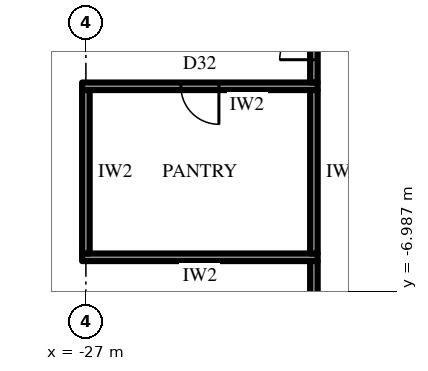
"""IFC4 building model, lengths in metres.
Left out: names, types, materials, properties, quantities, classifications, styles, units other than length and angle.
Written with IfcOpenShell. Run it as: python <this file> out.ifc"""

import sys

from ifc_helpers import new_model, si_unit, direction, frame, frame_2d, origin, place, context, subcontext, project, spatial, rectangle, extrude, element, fill, save


model = new_model("IFC4")
c1 = context("Model", 3, precision=1e-05, world=origin(), true_north=direction((0.0, 1.0)))
c2 = subcontext(c1, "Body", "Model", "MODEL_VIEW")
j1 = project(units=[si_unit("LENGTHUNIT", "METRE"), si_unit("PLANEANGLEUNIT", "RADIAN")], contexts=[c1])
p1 = place(None, origin())
s1 = spatial("IfcSite", under=j1, at=p1, CompositionType="ELEMENT")
p2 = place(p1, origin())
s2 = spatial("IfcBuilding", under=s1, at=p2, CompositionType="ELEMENT")
p3 = place(p2, frame((0.0, 0.0, 61.3)))
s3 = spatial("IfcBuildingStorey", under=s2, at=p3, CompositionType="ELEMENT", Elevation=61.3)
p4 = place(p3, frame((-37.398, -2.925, 0.0), z_axis=(0.0, 0.0, 1.0), x_axis=(0.499999163675, -0.866025886636, 0.0)))
e1 = element("IfcWall", 1, at=p4, inside=s3, PredefinedType="SOLIDWALL", context=c2, shape_type="SweptSolid", body=[
    extrude(rectangle(XDim=32.332, YDim=0.3, at=frame_2d((16.166, 0.0))), origin(), (0.0, 0.0, 1.0), 2.7),
])
p5 = place(p4, frame((1.319, 0.0, 0.6)))
e2 = element("IfcOpeningElement", 2, at=p5, cuts=e1, PredefinedType="OPENING", context=c2, shape_type="SweptSolid", body=[
    extrude(rectangle(XDim=2.75, YDim=1.85, at=frame_2d((1.375, 0.925))), frame((0.0, 0.16, 0.0), z_axis=(0.0, -1.0, 0.0), x_axis=(1.0, 0.0, 0.0)), (0.0, 0.0, 1.0), 0.32),
])
p6 = place(p4, frame((6.708, 0.0, 0.6)))
e3 = element("IfcOpeningElement", 3, at=p6, cuts=e1, PredefinedType="OPENING", context=c2, shape_type="SweptSolid", body=[
    extrude(rectangle(XDim=2.75, YDim=1.85, at=frame_2d((1.375, 0.925))), frame((0.0, 0.16, 0.0), z_axis=(0.0, -1.0, 0.0), x_axis=(1.0, 0.0, 0.0)), (0.0, 0.0, 1.0), 0.32),
])
p7 = place(p4, frame((12.872, 0.0, 0.0)))
e4 = element("IfcOpeningElement", 4, at=p7, cuts=e1, PredefinedType="OPENING", context=c2, shape_type="SweptSolid", body=[
    extrude(rectangle(XDim=1.2, YDim=2.4, at=frame_2d((0.6, 1.2))), frame((0.0, 0.16, 0.0), z_axis=(0.0, -1.0, 0.0), x_axis=(1.0, 0.0, 0.0)), (0.0, 0.0, 1.0), 0.32),
])
p8 = place(p4, frame((17.485, 0.0, 0.6)))
e5 = element("IfcOpeningElement", 5, at=p8, cuts=e1, PredefinedType="OPENING", context=c2, shape_type="SweptSolid", body=[
    extrude(rectangle(XDim=2.75, YDim=1.85, at=frame_2d((1.375, 0.925))), frame((0.0, 0.16, 0.0), z_axis=(0.0, -1.0, 0.0), x_axis=(1.0, 0.0, 0.0)), (0.0, 0.0, 1.0), 0.32),
])
p9 = place(p4, frame((22.874, 0.0, 0.6)))
e6 = element("IfcOpeningElement", 6, at=p9, cuts=e1, PredefinedType="OPENING", context=c2, shape_type="SweptSolid", body=[
    extrude(rectangle(XDim=2.75, YDim=1.85, at=frame_2d((1.375, 0.925))), frame((0.0, 0.16, 0.0), z_axis=(0.0, -1.0, 0.0), x_axis=(1.0, 0.0, 0.0)), (0.0, 0.0, 1.0), 0.32),
])
p10 = place(p4, frame((28.262, 0.0, 0.6)))
e7 = element("IfcOpeningElement", 7, at=p10, cuts=e1, PredefinedType="OPENING", context=c2, shape_type="SweptSolid", body=[
    extrude(rectangle(XDim=2.75, YDim=1.85, at=frame_2d((1.375, 0.925))), frame((0.0, 0.16, 0.0), z_axis=(0.0, -1.0, 0.0), x_axis=(1.0, 0.0, 0.0)), (0.0, 0.0, 1.0), 0.32),
])
p11 = place(p3, frame((-20.9, -1.6, 0.0), z_axis=(0.0, 0.0, 1.0), x_axis=(-1.0, 0.0, 0.0)))
e8 = element("IfcWall", 8, at=p11, inside=s3, PredefinedType="PARTITIONING", context=c2, shape_type="SweptSolid", body=[
    extrude(rectangle(XDim=6.2, YDim=0.2, at=frame_2d((3.1, 0.0))), origin(), (0.0, 0.0, 1.0), 4.0),
])
p12 = place(p11, frame((2.6, 0.0, 0.0)))
e9 = element("IfcOpeningElement", 9, at=p12, cuts=e8, PredefinedType="OPENING", context=c2, shape_type="SweptSolid", body=[
    extrude(rectangle(XDim=1.0, YDim=2.2, at=frame_2d((0.5, 1.1))), frame((0.0, 0.11, 0.0), z_axis=(0.0, -1.0, 0.0), x_axis=(1.0, 0.0, 0.0)), (0.0, 0.0, 1.0), 0.22),
])
p13 = place(p3, frame((-20.9, -6.1, 0.0), z_axis=(0.0, 0.0, 1.0), x_axis=(-1.0, 0.0, 0.0)))
e10 = element("IfcWall", 10, at=p13, inside=s3, PredefinedType="PARTITIONING", context=c2, shape_type="SweptSolid", body=[
    extrude(rectangle(XDim=6.2, YDim=0.2, at=frame_2d((3.1, 0.0))), origin(), (0.0, 0.0, 1.0), 4.0),
])
for number, where, z_axis, x_axis in (
    (11, (-21.0, -1.7, 0.0), (0.0, 0.0, 1.0), (0.0, -1.0, 0.0)),
    (12, (-27.0, -1.7, 0.0), (0.0, 0.0, 1.0), (0.0, -1.0, 0.0)),
):
    element("IfcWall", number, at=place(p3, frame(where, z_axis=z_axis, x_axis=x_axis)), inside=s3, PredefinedType="PARTITIONING", context=c2, shape_type="SweptSolid", body=[
        extrude(rectangle(XDim=4.3, YDim=0.2, at=frame_2d((2.15, 0.0))), origin(), (0.0, 0.0, 1.0), 4.0),
    ])
p14 = place(p3, frame((-21.0, -13.1, 0.0), z_axis=(0.0, 0.0, 1.0), x_axis=(0.0, 1.0, 0.0)))
e13 = element("IfcWall", 13, at=p14, inside=s3, PredefinedType="PARTITIONING", context=c2, shape_type="SweptSolid", body=[
    extrude(rectangle(XDim=6.899, YDim=0.2, at=frame_2d((3.45, 0.0))), origin(), (0.0, 0.0, 1.0), 4.0),
])
p15 = place(p3, frame((-21.0, -1.499, 0.0), z_axis=(0.0, 0.0, 1.0), x_axis=(0.0, 1.0, 0.0)))
e14 = element("IfcWall", 14, at=p15, inside=s3, PredefinedType="PARTITIONING", context=c2, shape_type="SweptSolid", body=[
    extrude(rectangle(XDim=14.599, YDim=0.2, at=frame_2d((7.3, 0.0))), origin(), (0.0, 0.0, 1.0), 4.0),
])
p16 = place(p15, frame((0.599, 0.0, 0.0)))
e15 = element("IfcOpeningElement", 15, at=p16, cuts=e14, PredefinedType="OPENING", context=c2, shape_type="SweptSolid", body=[
    extrude(rectangle(XDim=1.8, YDim=2.4, at=frame_2d((0.9, 1.2))), frame((0.0, 0.11, 0.0), z_axis=(0.0, -1.0, 0.0), x_axis=(1.0, 0.0, 0.0)), (0.0, 0.0, 1.0), 0.22),
])
p17 = place(p12, origin())
e16 = element("IfcDoor", 16, at=p17, inside=s3, OperationType="SINGLE_SWING_RIGHT", PredefinedType="DOOR", context=c2, shape_type="SweptSolid", body=[
    extrude(rectangle(XDim=1.0, YDim=2.2, at=frame_2d((0.5, 1.1))), frame((0.0, 0.025, 0.0), z_axis=(0.0, -1.0, 0.0), x_axis=(1.0, 0.0, 0.0)), (0.0, 0.0, 1.0), 0.05),
])
fill(e9, e16)
p18 = place(p16, origin())
e17 = element("IfcDoor", 17, at=p18, inside=s3, OperationType="DOUBLE_DOOR_SINGLE_SWING", PredefinedType="DOOR", context=c2, shape_type="SweptSolid", body=[
    extrude(rectangle(XDim=1.8, YDim=2.4, at=frame_2d((0.9, 1.2))), frame((0.0, 0.025, 0.0), z_axis=(0.0, -1.0, 0.0), x_axis=(1.0, 0.0, 0.0)), (0.0, 0.0, 1.0), 0.05),
])
fill(e15, e17)
save(model, sys.argv[1])
